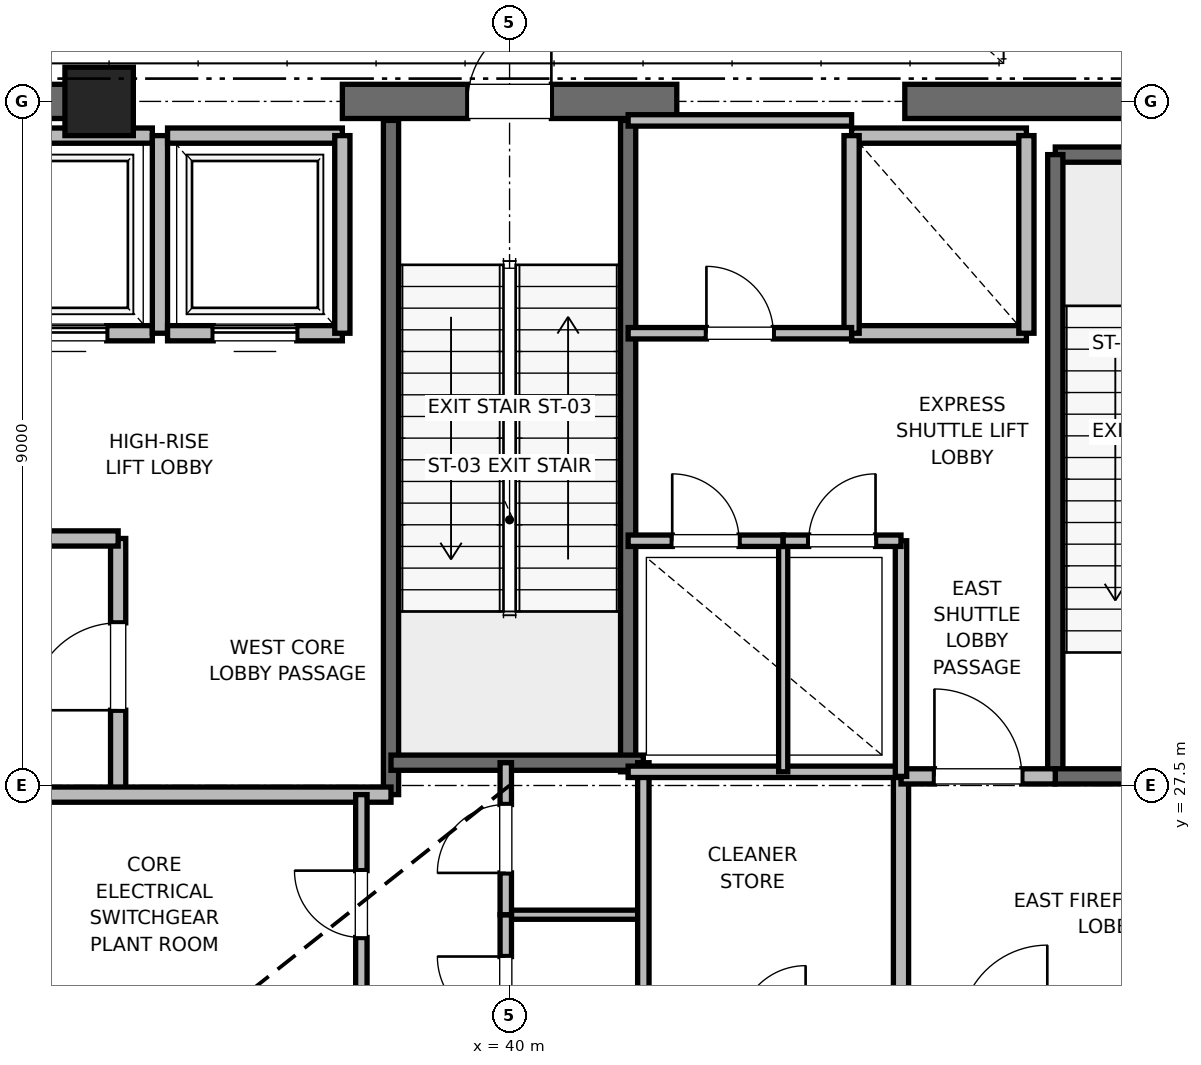
"""IFC4 building model, lengths in metres.
Left out: names, types, materials, properties, quantities, classifications, styles, units other than length and angle.
Written with IfcOpenShell. Run it as: python <this file> out.ifc"""

import sys

from ifc_helpers import new_model, si_unit, direction, frame, frame_2d, origin, origin_2d, place, context, subcontext, project, spatial, rectangle, extrude, element, fill, save


model = new_model("IFC4")
c1 = context("Model", 3, precision=1e-05, world=origin(), true_north=direction((0.0, 1.0)))
c2 = subcontext(c1, "Body", "Model", "MODEL_VIEW")
j1 = project(units=[si_unit("LENGTHUNIT", "METRE"), si_unit("PLANEANGLEUNIT", "RADIAN")], contexts=[c1])
p1 = place(None, origin())
s1 = spatial("IfcSite", under=j1, at=p1, CompositionType="ELEMENT")
p2 = place(p1, origin())
s2 = spatial("IfcBuilding", under=s1, at=p2, CompositionType="ELEMENT")
p3 = place(p2, frame((0.0, 0.0, 295.2)))
s3 = spatial("IfcBuildingStorey", under=s2, at=p3, CompositionType="ELEMENT", Elevation=295.2)
p4 = place(p3, frame((34.6, 36.5, 0.0), z_axis=(0.0, 0.0, 1.0), x_axis=(1.0, 0.0, 0.0)))
e1 = element("IfcColumn", 1, at=p4, inside=s3, PredefinedType="PILASTER", context=c2, shape_type="SweptSolid", body=[
    extrude(rectangle(XDim=0.9, YDim=0.9, at=origin_2d()), origin(), (0.0, 0.0, 1.0), 5.8),
])
p5 = place(p3, frame((29.0, 36.5, 0.0), z_axis=(0.0, 0.0, 1.0), x_axis=(1.0, 0.0, 0.0)))
e2 = element("IfcWall", 2, at=p5, inside=s3, PredefinedType="SHEAR", context=c2, shape_type="SweptSolid", body=[
    extrude(rectangle(XDim=5.8, YDim=0.45, at=frame_2d((2.9, 0.0))), origin(), (0.0, 0.0, 1.0), 5.5),
])
p6 = place(p3, frame((37.8, 36.5, 0.0), z_axis=(0.0, 0.0, 1.0), x_axis=(1.0, 0.0, 0.0)))
e3 = element("IfcWall", 3, at=p6, inside=s3, PredefinedType="SHEAR", context=c2, shape_type="SweptSolid", body=[
    extrude(rectangle(XDim=4.4, YDim=0.45, at=frame_2d((2.2, 0.0))), origin(), (0.0, 0.0, 1.0), 5.5),
])
p7 = place(p6, frame((1.65, 0.0, 0.0)))
e4 = element("IfcOpeningElement", 4, at=p7, cuts=e3, PredefinedType="OPENING", context=c2, shape_type="SweptSolid", body=[
    extrude(rectangle(XDim=1.1, YDim=2.15, at=frame_2d((0.55, 1.075))), frame((0.0, 0.225, 0.0), z_axis=(0.0, -1.0, 0.0), x_axis=(1.0, 0.0, 0.0)), (0.0, 0.0, 1.0), 0.45),
])
p8 = place(p3, frame((45.2, 36.5, 0.0), z_axis=(0.0, 0.0, 1.0), x_axis=(1.0, 0.0, 0.0)))
e5 = element("IfcWall", 5, at=p8, inside=s3, PredefinedType="SHEAR", context=c2, shape_type="SweptSolid", body=[
    extrude(rectangle(XDim=5.8, YDim=0.45, at=frame_2d((2.9, 0.0))), origin(), (0.0, 0.0, 1.0), 5.5),
])
p9 = place(p3, frame((47.18, 35.8, 0.0), z_axis=(0.0, 0.0, 1.0), x_axis=(1.0, 0.0, 0.0)))
e6 = element("IfcWall", 6, at=p9, inside=s3, PredefinedType="SOLIDWALL", context=c2, shape_type="SweptSolid", body=[
    extrude(rectangle(XDim=3.12, YDim=0.2, at=frame_2d((1.56, 0.0))), origin(), (0.0, 0.0, 1.0), 5.5),
])
p10 = place(p3, frame((47.18, 27.62, 0.0), z_axis=(0.0, 0.0, 1.0), x_axis=(0.0, 1.0, 0.0)))
e7 = element("IfcWall", 7, at=p10, inside=s3, PredefinedType="SOLIDWALL", context=c2, shape_type="SweptSolid", body=[
    extrude(rectangle(XDim=8.18, YDim=0.2, at=frame_2d((4.09, 0.0))), origin(), (0.0, 0.0, 1.0), 5.5),
])
p11 = place(p3, frame((47.18, 27.62, 0.0), z_axis=(0.0, 0.0, 1.0), x_axis=(1.0, 0.0, 0.0)))
e8 = element("IfcWall", 8, at=p11, inside=s3, PredefinedType="SOLIDWALL", context=c2, shape_type="SweptSolid", body=[
    extrude(rectangle(XDim=3.12, YDim=0.2, at=frame_2d((1.56, 0.0))), origin(), (0.0, 0.0, 1.0), 5.5),
])
p12 = place(p11, frame((1.01, 0.0, 0.0)))
e9 = element("IfcOpeningElement", 9, at=p12, cuts=e8, PredefinedType="OPENING", context=c2, shape_type="SweptSolid", body=[
    extrude(rectangle(XDim=1.1, YDim=2.15, at=frame_2d((0.55, 1.075))), frame((0.0, 0.1, 0.0), z_axis=(0.0, -1.0, 0.0), x_axis=(1.0, 0.0, 0.0)), (0.0, 0.0, 1.0), 0.2),
])
p13 = place(p3, frame((38.44, 27.38, 0.0), z_axis=(0.0, 0.0, 1.0), x_axis=(0.0, 1.0, 0.0)))
e10 = element("IfcWall", 10, at=p13, inside=s3, PredefinedType="SOLIDWALL", context=c2, shape_type="SweptSolid", body=[
    extrude(rectangle(XDim=8.87, YDim=0.2, at=frame_2d((4.435, 0.0))), origin(), (0.0, 0.0, 1.0), 5.5),
])
p14 = place(p3, frame((41.56, 27.68, 0.0), z_axis=(0.0, 0.0, 1.0), x_axis=(0.0, 1.0, 0.0)))
e11 = element("IfcWall", 11, at=p14, inside=s3, PredefinedType="SOLIDWALL", context=c2, shape_type="SweptSolid", body=[
    extrude(rectangle(XDim=8.57, YDim=0.2, at=frame_2d((4.285, 0.0))), origin(), (0.0, 0.0, 1.0), 5.5),
])
p15 = place(p3, frame((38.44, 27.8, 0.0), z_axis=(0.0, 0.0, 1.0), x_axis=(1.0, 0.0, 0.0)))
e12 = element("IfcWall", 12, at=p15, inside=s3, PredefinedType="SOLIDWALL", context=c2, shape_type="SweptSolid", body=[
    extrude(rectangle(XDim=3.32, YDim=0.2, at=frame_2d((1.66, 0.0))), origin(), (0.0, 0.0, 1.0), 5.5),
])
p16 = place(p3, frame((34.85, 27.38, 0.0), z_axis=(0.0, 0.0, 1.0), x_axis=(0.0, 1.0, 0.0)))
e13 = element("IfcWall", 13, at=p16, inside=s3, PredefinedType="PARTITIONING", context=c2, shape_type="SweptSolid", body=[
    extrude(rectangle(XDim=3.37, YDim=0.2, at=frame_2d((1.685, 0.0))), origin(), (0.0, 0.0, 1.0), 5.5),
])
p17 = place(p16, frame((1.11, 0.0, 0.0)))
e14 = element("IfcOpeningElement", 14, at=p17, cuts=e13, PredefinedType="OPENING", context=c2, shape_type="SweptSolid", body=[
    extrude(rectangle(XDim=1.15, YDim=2.2, at=frame_2d((0.575, 1.1))), frame((0.0, 0.1, 0.0), z_axis=(0.0, -1.0, 0.0), x_axis=(1.0, 0.0, 0.0)), (0.0, 0.0, 1.0), 0.2),
])
p18 = place(p3, frame((32.82, 27.38, 0.0), z_axis=(0.0, 0.0, 1.0), x_axis=(1.0, 0.0, 0.0)))
e15 = element("IfcWall", 15, at=p18, inside=s3, PredefinedType="PARTITIONING", context=c2, shape_type="SweptSolid", body=[
    extrude(rectangle(XDim=5.62, YDim=0.2, at=frame_2d((2.81, 0.0))), origin(), (0.0, 0.0, 1.0), 5.5),
])
p19 = place(p3, frame((32.15, 30.75, 0.0), z_axis=(0.0, 0.0, 1.0), x_axis=(1.0, 0.0, 0.0)))
e16 = element("IfcWall", 16, at=p19, inside=s3, PredefinedType="PARTITIONING", context=c2, shape_type="SweptSolid", body=[
    extrude(rectangle(XDim=2.7, YDim=0.2, at=frame_2d((1.35, 0.0))), origin(), (0.0, 0.0, 1.0), 5.5),
])
p20 = place(p3, frame((45.15, 24.25, 0.0), z_axis=(0.0, 0.0, 1.0), x_axis=(0.0, 1.0, 0.0)))
e17 = element("IfcWall", 17, at=p20, inside=s3, PredefinedType="PARTITIONING", context=c2, shape_type="SweptSolid", body=[
    extrude(rectangle(XDim=3.37, YDim=0.2, at=frame_2d((1.685, 0.0))), origin(), (0.0, 0.0, 1.0), 5.5),
])
p21 = place(p3, frame((45.15, 27.62, 0.0), z_axis=(0.0, 0.0, 1.0), x_axis=(1.0, 0.0, 0.0)))
e18 = element("IfcWall", 18, at=p21, inside=s3, PredefinedType="PARTITIONING", context=c2, shape_type="SweptSolid", body=[
    extrude(rectangle(XDim=2.03, YDim=0.2, at=frame_2d((1.015, 0.0))), origin(), (0.0, 0.0, 1.0), 5.5),
])
p22 = place(p21, frame((0.44, 0.0, 0.0)))
e19 = element("IfcOpeningElement", 19, at=p22, cuts=e18, PredefinedType="OPENING", context=c2, shape_type="SweptSolid", body=[
    extrude(rectangle(XDim=1.15, YDim=2.2, at=frame_2d((0.575, 1.1))), frame((0.0, 0.1, 0.0), z_axis=(0.0, -1.0, 0.0), x_axis=(1.0, 0.0, 0.0)), (0.0, 0.0, 1.0), 0.2),
])
p23 = place(p3, frame((33.0, 33.45, 0.0), z_axis=(0.0, 0.0, 1.0), x_axis=(1.0, 0.0, 0.0)))
e20 = element("IfcWall", 20, at=p23, inside=s3, PredefinedType="SOLIDWALL", context=c2, shape_type="SweptSolid", body=[
    extrude(rectangle(XDim=2.3, YDim=0.2, at=frame_2d((1.15, 0.0))), origin(), (0.0, 0.0, 1.0), 5.5),
])
p24 = place(p23, frame((0.6, 0.0, 0.0)))
e21 = element("IfcOpeningElement", 21, at=p24, cuts=e20, PredefinedType="OPENING", context=c2, shape_type="SweptSolid", body=[
    extrude(rectangle(XDim=1.1, YDim=2.2, at=frame_2d((0.55, 1.1))), frame((0.0, 0.1, 0.0), z_axis=(0.0, -1.0, 0.0), x_axis=(1.0, 0.0, 0.0)), (0.0, 0.0, 1.0), 0.2),
])
p25 = place(p3, frame((35.3, 36.05, 0.0), z_axis=(0.0, 0.0, 1.0), x_axis=(-1.0, 0.0, 0.0)))
e22 = element("IfcWall", 22, at=p25, inside=s3, PredefinedType="SOLIDWALL", context=c2, shape_type="SweptSolid", body=[
    extrude(rectangle(XDim=2.3, YDim=0.2, at=frame_2d((1.15, 0.0))), origin(), (0.0, 0.0, 1.0), 4.58),
])
p26 = place(p3, frame((35.4, 33.45, 0.0), z_axis=(0.0, 0.0, 1.0), x_axis=(0.0, 1.0, 0.0)))
e23 = element("IfcWall", 23, at=p26, inside=s3, PredefinedType="SOLIDWALL", context=c2, shape_type="SweptSolid", body=[
    extrude(rectangle(XDim=2.6, YDim=0.2, at=frame_2d((1.3, 0.0))), origin(), (0.0, 0.0, 1.0), 4.58),
])
p27 = place(p3, frame((35.5, 33.45, 0.0), z_axis=(0.0, 0.0, 1.0), x_axis=(1.0, 0.0, 0.0)))
e24 = element("IfcWall", 24, at=p27, inside=s3, PredefinedType="SOLIDWALL", context=c2, shape_type="SweptSolid", body=[
    extrude(rectangle(XDim=2.3, YDim=0.2, at=frame_2d((1.15, 0.0))), origin(), (0.0, 0.0, 1.0), 5.5),
])
p28 = place(p27, frame((0.6, 0.0, 0.0)))
e25 = element("IfcOpeningElement", 25, at=p28, cuts=e24, PredefinedType="OPENING", context=c2, shape_type="SweptSolid", body=[
    extrude(rectangle(XDim=1.1, YDim=2.2, at=frame_2d((0.55, 1.1))), frame((0.0, 0.1, 0.0), z_axis=(0.0, -1.0, 0.0), x_axis=(1.0, 0.0, 0.0)), (0.0, 0.0, 1.0), 0.2),
])
p29 = place(p3, frame((37.8, 36.05, 0.0), z_axis=(0.0, 0.0, 1.0), x_axis=(-1.0, 0.0, 0.0)))
e26 = element("IfcWall", 26, at=p29, inside=s3, PredefinedType="SOLIDWALL", context=c2, shape_type="SweptSolid", body=[
    extrude(rectangle(XDim=2.3, YDim=0.2, at=frame_2d((1.15, 0.0))), origin(), (0.0, 0.0, 1.0), 4.58),
])
p30 = place(p3, frame((37.8, 33.45, 0.0), z_axis=(0.0, 0.0, 1.0), x_axis=(0.0, 1.0, 0.0)))
e27 = element("IfcWall", 27, at=p30, inside=s3, PredefinedType="SOLIDWALL", context=c2, shape_type="SweptSolid", body=[
    extrude(rectangle(XDim=2.6, YDim=0.2, at=frame_2d((1.3, 0.0))), origin(), (0.0, 0.0, 1.0), 4.58),
])
p31 = place(p3, frame((44.5, 33.45, 0.0), z_axis=(0.0, 0.0, 1.0), x_axis=(1.0, 0.0, 0.0)))
e28 = element("IfcWall", 28, at=p31, inside=s3, PredefinedType="SOLIDWALL", context=c2, shape_type="SweptSolid", body=[
    extrude(rectangle(XDim=2.3, YDim=0.2, at=frame_2d((1.15, 0.0))), origin(), (0.0, 0.0, 1.0), 5.5),
])
p32 = place(p3, frame((46.8, 36.05, 0.0), z_axis=(0.0, 0.0, 1.0), x_axis=(-1.0, 0.0, 0.0)))
e29 = element("IfcWall", 29, at=p32, inside=s3, PredefinedType="SOLIDWALL", context=c2, shape_type="SweptSolid", body=[
    extrude(rectangle(XDim=2.3, YDim=0.2, at=frame_2d((1.15, 0.0))), origin(), (0.0, 0.0, 1.0), 4.58),
])
p33 = place(p3, frame((44.5, 36.05, 0.0), z_axis=(0.0, 0.0, 1.0), x_axis=(0.0, -1.0, 0.0)))
e30 = element("IfcWall", 30, at=p33, inside=s3, PredefinedType="SOLIDWALL", context=c2, shape_type="SweptSolid", body=[
    extrude(rectangle(XDim=2.6, YDim=0.2, at=frame_2d((1.3, 0.0))), origin(), (0.0, 0.0, 1.0), 4.58),
])
p34 = place(p3, frame((46.8, 33.45, 0.0), z_axis=(0.0, 0.0, 1.0), x_axis=(0.0, 1.0, 0.0)))
e31 = element("IfcWall", 31, at=p34, inside=s3, PredefinedType="SOLIDWALL", context=c2, shape_type="SweptSolid", body=[
    extrude(rectangle(XDim=2.6, YDim=0.2, at=frame_2d((1.3, 0.0))), origin(), (0.0, 0.0, 1.0), 5.5),
])
p35 = place(p3, frame((39.95, 25.8, 0.0), z_axis=(0.0, 0.0, 1.0), x_axis=(1.0, 0.0, 0.0)))
e32 = element("IfcWall", 32, at=p35, inside=s3, PredefinedType="PARTITIONING", context=c2, shape_type="SweptSolid", body=[
    extrude(rectangle(XDim=1.81, YDim=0.12, at=frame_2d((0.905, 0.0))), origin(), (0.0, 0.0, 1.0), 2.85),
])
p36 = place(p3, frame((41.76, 23.8, 0.0), z_axis=(0.0, 0.0, 1.0), x_axis=(0.0, 1.0, 0.0)))
e33 = element("IfcWall", 33, at=p36, inside=s3, PredefinedType="PARTITIONING", context=c2, shape_type="SweptSolid", body=[
    extrude(rectangle(XDim=4.0, YDim=0.15, at=frame_2d((2.0, 0.0))), origin(), (0.0, 0.0, 1.0), 2.85),
])
p37 = place(p3, frame((39.95, 23.8, 0.0), z_axis=(0.0, 0.0, 1.0), x_axis=(0.0, 1.0, 0.0)))
e34 = element("IfcWall", 34, at=p37, inside=s3, PredefinedType="PARTITIONING", context=c2, shape_type="SweptSolid", body=[
    extrude(rectangle(XDim=2.0, YDim=0.15, at=frame_2d((1.0, 0.0))), origin(), (0.0, 0.0, 1.0), 2.85),
])
p38 = place(p37, frame((0.55, 0.0, 0.0)))
e35 = element("IfcOpeningElement", 35, at=p38, cuts=e34, PredefinedType="OPENING", context=c2, shape_type="SweptSolid", body=[
    extrude(rectangle(XDim=0.9, YDim=2.1, at=frame_2d((0.45, 1.05))), frame((0.0, 0.075, 0.0), z_axis=(0.0, -1.0, 0.0), x_axis=(1.0, 0.0, 0.0)), (0.0, 0.0, 1.0), 0.15),
])
p39 = place(p3, frame((39.95, 25.8, 0.0), z_axis=(0.0, 0.0, 1.0), x_axis=(0.0, 1.0, 0.0)))
e36 = element("IfcWall", 36, at=p39, inside=s3, PredefinedType="PARTITIONING", context=c2, shape_type="SweptSolid", body=[
    extrude(rectangle(XDim=2.0, YDim=0.15, at=frame_2d((1.0, 0.0))), origin(), (0.0, 0.0, 1.0), 2.85),
])
p40 = place(p39, frame((0.55, 0.0, 0.0)))
e37 = element("IfcOpeningElement", 37, at=p40, cuts=e36, PredefinedType="OPENING", context=c2, shape_type="SweptSolid", body=[
    extrude(rectangle(XDim=0.9, YDim=2.1, at=frame_2d((0.45, 1.05))), frame((0.0, 0.075, 0.0), z_axis=(0.0, -1.0, 0.0), x_axis=(1.0, 0.0, 0.0)), (0.0, 0.0, 1.0), 0.15),
])
p41 = place(p3, frame((38.05, 24.5, 0.0), z_axis=(0.0, 0.0, 1.0), x_axis=(0.0, 1.0, 0.0)))
e38 = element("IfcWall", 38, at=p41, inside=s3, PredefinedType="PARTITIONING", context=c2, shape_type="SweptSolid", body=[
    extrude(rectangle(XDim=2.88, YDim=0.15, at=frame_2d((1.44, 0.0))), origin(), (0.0, 0.0, 1.0), 2.85),
])
p42 = place(p41, frame((1.0, 0.0, 0.0)))
e39 = element("IfcOpeningElement", 39, at=p42, cuts=e38, PredefinedType="OPENING", context=c2, shape_type="SweptSolid", body=[
    extrude(rectangle(XDim=0.88, YDim=2.1, at=frame_2d((0.44, 1.05))), frame((0.0, 0.075, 0.0), z_axis=(0.0, -1.0, 0.0), x_axis=(1.0, 0.0, 0.0)), (0.0, 0.0, 1.0), 0.15),
])
p43 = place(p3, frame((41.56, 27.68, 0.0), z_axis=(0.0, 0.0, 1.0), x_axis=(1.0, 0.0, 0.0)))
e40 = element("IfcWall", 40, at=p43, inside=s3, PredefinedType="PARTITIONING", context=c2, shape_type="SweptSolid", body=[
    extrude(rectangle(XDim=3.59, YDim=0.15, at=frame_2d((1.795, 0.0))), origin(), (0.0, 0.0, 1.0), 2.85),
])
p44 = place(p3, frame((45.15, 27.62, 0.0), z_axis=(0.0, 0.0, 1.0), x_axis=(0.0, 1.0, 0.0)))
e41 = element("IfcWall", 41, at=p44, inside=s3, PredefinedType="PARTITIONING", context=c2, shape_type="SweptSolid", body=[
    extrude(rectangle(XDim=3.1, YDim=0.15, at=frame_2d((1.55, 0.0))), origin(), (0.0, 0.0, 1.0), 2.85),
])
p45 = place(p3, frame((43.6, 27.68, 0.0), z_axis=(0.0, 0.0, 1.0), x_axis=(0.0, 1.0, 0.0)))
e42 = element("IfcWall", 42, at=p45, inside=s3, PredefinedType="PARTITIONING", context=c2, shape_type="SweptSolid", body=[
    extrude(rectangle(XDim=3.04, YDim=0.12, at=frame_2d((1.52, 0.0))), origin(), (0.0, 0.0, 1.0), 2.85),
])
p46 = place(p3, frame((41.56, 30.72, 0.0), z_axis=(0.0, 0.0, 1.0), x_axis=(1.0, 0.0, 0.0)))
e43 = element("IfcWall", 43, at=p46, inside=s3, PredefinedType="PARTITIONING", context=c2, shape_type="SweptSolid", body=[
    extrude(rectangle(XDim=2.04, YDim=0.15, at=frame_2d((1.02, 0.0))), origin(), (0.0, 0.0, 1.0), 2.85),
])
p47 = place(p46, frame((0.58, 0.0, 0.0)))
e44 = element("IfcOpeningElement", 44, at=p47, cuts=e43, PredefinedType="OPENING", context=c2, shape_type="SweptSolid", body=[
    extrude(rectangle(XDim=0.88, YDim=2.1, at=frame_2d((0.44, 1.05))), frame((0.0, 0.075, 0.0), z_axis=(0.0, -1.0, 0.0), x_axis=(1.0, 0.0, 0.0)), (0.0, 0.0, 1.0), 0.15),
])
p48 = place(p3, frame((43.6, 30.72, 0.0), z_axis=(0.0, 0.0, 1.0), x_axis=(1.0, 0.0, 0.0)))
e45 = element("IfcWall", 45, at=p48, inside=s3, PredefinedType="PARTITIONING", context=c2, shape_type="SweptSolid", body=[
    extrude(rectangle(XDim=1.55, YDim=0.15, at=frame_2d((0.775, 0.0))), origin(), (0.0, 0.0, 1.0), 2.85),
])
p49 = place(p48, frame((0.335, 0.0, 0.0)))
e46 = element("IfcOpeningElement", 46, at=p49, cuts=e45, PredefinedType="OPENING", context=c2, shape_type="SweptSolid", body=[
    extrude(rectangle(XDim=0.88, YDim=2.1, at=frame_2d((0.44, 1.05))), frame((0.0, 0.075, 0.0), z_axis=(0.0, -1.0, 0.0), x_axis=(1.0, 0.0, 0.0)), (0.0, 0.0, 1.0), 0.15),
])
p50 = place(p3, frame((41.56, 36.25, 0.0), z_axis=(0.0, 0.0, 1.0), x_axis=(1.0, 0.0, 0.0)))
e47 = element("IfcWall", 47, at=p50, inside=s3, PredefinedType="PARTITIONING", context=c2, shape_type="SweptSolid", body=[
    extrude(rectangle(XDim=2.94, YDim=0.15, at=frame_2d((1.47, 0.0))), origin(), (0.0, 0.0, 1.0), 2.85),
])
p51 = place(p3, frame((41.56, 33.45, 0.0), z_axis=(0.0, 0.0, 1.0), x_axis=(1.0, 0.0, 0.0)))
e48 = element("IfcWall", 48, at=p51, inside=s3, PredefinedType="PARTITIONING", context=c2, shape_type="SweptSolid", body=[
    extrude(rectangle(XDim=2.94, YDim=0.15, at=frame_2d((1.47, 0.0))), origin(), (0.0, 0.0, 1.0), 2.85),
])
p52 = place(p51, frame((1.03, 0.0, 0.0)))
e49 = element("IfcOpeningElement", 49, at=p52, cuts=e48, PredefinedType="OPENING", context=c2, shape_type="SweptSolid", body=[
    extrude(rectangle(XDim=0.88, YDim=2.1, at=frame_2d((0.44, 1.05))), frame((0.0, 0.075, 0.0), z_axis=(0.0, -1.0, 0.0), x_axis=(1.0, 0.0, 0.0)), (0.0, 0.0, 1.0), 0.15),
])
p53 = place(p7, origin())
e50 = element("IfcDoor", 50, at=p53, inside=s3, OperationType="SINGLE_SWING_RIGHT", PredefinedType="DOOR", context=c2, shape_type="SweptSolid", body=[
    extrude(rectangle(XDim=1.1, YDim=2.15, at=frame_2d((0.55, 1.075))), frame((0.0, 0.025, 0.0), z_axis=(0.0, -1.0, 0.0), x_axis=(1.0, 0.0, 0.0)), (0.0, 0.0, 1.0), 0.05),
])
fill(e4, e50)
p54 = place(p17, origin())
e51 = element("IfcDoor", 51, at=p54, inside=s3, OperationType="SINGLE_SWING_LEFT", PredefinedType="DOOR", context=c2, shape_type="SweptSolid", body=[
    extrude(rectangle(XDim=1.15, YDim=2.2, at=frame_2d((0.575, 1.1))), frame((0.0, 0.025, 0.0), z_axis=(0.0, -1.0, 0.0), x_axis=(1.0, 0.0, 0.0)), (0.0, 0.0, 1.0), 0.05),
])
fill(e14, e51)
p55 = place(p22, origin())
e52 = element("IfcDoor", 52, at=p55, inside=s3, OperationType="SINGLE_SWING_LEFT", PredefinedType="DOOR", context=c2, shape_type="SweptSolid", body=[
    extrude(rectangle(XDim=1.15, YDim=2.2, at=frame_2d((0.575, 1.1))), frame((0.0, 0.025, 0.0), z_axis=(0.0, -1.0, 0.0), x_axis=(1.0, 0.0, 0.0)), (0.0, 0.0, 1.0), 0.05),
])
fill(e19, e52)
p56 = place(p24, origin())
e53 = element("IfcDoor", 53, at=p56, inside=s3, OperationType="SLIDING_TO_RIGHT", PredefinedType="DOOR", context=c2, shape_type="SweptSolid", body=[
    extrude(rectangle(XDim=1.1, YDim=2.2, at=frame_2d((0.55, 1.1))), frame((0.0, 0.025, 0.0), z_axis=(0.0, -1.0, 0.0), x_axis=(1.0, 0.0, 0.0)), (0.0, 0.0, 1.0), 0.05),
])
fill(e21, e53)
p57 = place(p28, origin())
e54 = element("IfcDoor", 54, at=p57, inside=s3, OperationType="SLIDING_TO_RIGHT", PredefinedType="DOOR", context=c2, shape_type="SweptSolid", body=[
    extrude(rectangle(XDim=1.1, YDim=2.2, at=frame_2d((0.55, 1.1))), frame((0.0, 0.025, 0.0), z_axis=(0.0, -1.0, 0.0), x_axis=(1.0, 0.0, 0.0)), (0.0, 0.0, 1.0), 0.05),
])
fill(e25, e54)
p58 = place(p38, origin())
e55 = element("IfcDoor", 55, at=p58, inside=s3, OperationType="SINGLE_SWING_RIGHT", PredefinedType="DOOR", context=c2, shape_type="SweptSolid", body=[
    extrude(rectangle(XDim=0.9, YDim=2.1, at=frame_2d((0.45, 1.05))), frame((0.0, 0.025, 0.0), z_axis=(0.0, -1.0, 0.0), x_axis=(1.0, 0.0, 0.0)), (0.0, 0.0, 1.0), 0.05),
])
fill(e35, e55)
p59 = place(p40, origin())
e56 = element("IfcDoor", 56, at=p59, inside=s3, OperationType="SINGLE_SWING_LEFT", PredefinedType="DOOR", context=c2, shape_type="SweptSolid", body=[
    extrude(rectangle(XDim=0.9, YDim=2.1, at=frame_2d((0.45, 1.05))), frame((0.0, 0.025, 0.0), z_axis=(0.0, -1.0, 0.0), x_axis=(1.0, 0.0, 0.0)), (0.0, 0.0, 1.0), 0.05),
])
fill(e37, e56)
p60 = place(p42, origin())
e57 = element("IfcDoor", 57, at=p60, inside=s3, OperationType="SINGLE_SWING_RIGHT", PredefinedType="DOOR", context=c2, shape_type="SweptSolid", body=[
    extrude(rectangle(XDim=0.88, YDim=2.1, at=frame_2d((0.44, 1.05))), frame((0.0, 0.025, 0.0), z_axis=(0.0, -1.0, 0.0), x_axis=(1.0, 0.0, 0.0)), (0.0, 0.0, 1.0), 0.05),
])
fill(e39, e57)
p61 = place(p47, origin())
e58 = element("IfcDoor", 58, at=p61, inside=s3, OperationType="SINGLE_SWING_LEFT", PredefinedType="DOOR", context=c2, shape_type="SweptSolid", body=[
    extrude(rectangle(XDim=0.88, YDim=2.1, at=frame_2d((0.44, 1.05))), frame((0.0, 0.025, 0.0), z_axis=(0.0, -1.0, 0.0), x_axis=(1.0, 0.0, 0.0)), (0.0, 0.0, 1.0), 0.05),
])
fill(e44, e58)
p62 = place(p49, origin())
e59 = element("IfcDoor", 59, at=p62, inside=s3, OperationType="SINGLE_SWING_RIGHT", PredefinedType="DOOR", context=c2, shape_type="SweptSolid", body=[
    extrude(rectangle(XDim=0.88, YDim=2.1, at=frame_2d((0.44, 1.05))), frame((0.0, 0.025, 0.0), z_axis=(0.0, -1.0, 0.0), x_axis=(1.0, 0.0, 0.0)), (0.0, 0.0, 1.0), 0.05),
])
fill(e46, e59)
p63 = place(p52, origin())
e60 = element("IfcDoor", 60, at=p63, inside=s3, OperationType="SINGLE_SWING_LEFT", PredefinedType="DOOR", context=c2, shape_type="SweptSolid", body=[
    extrude(rectangle(XDim=0.88, YDim=2.1, at=frame_2d((0.44, 1.05))), frame((0.0, 0.025, 0.0), z_axis=(0.0, -1.0, 0.0), x_axis=(1.0, 0.0, 0.0)), (0.0, 0.0, 1.0), 0.05),
])
fill(e49, e60)
save(model, sys.argv[1])
